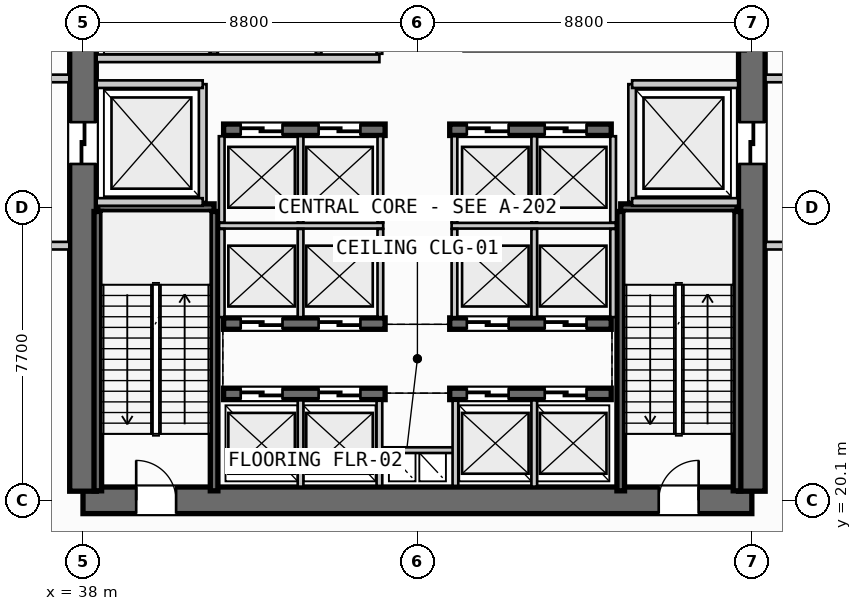
"""IFC4 building model, lengths in metres.
Left out: names, types, materials, properties, quantities, classifications, styles, units other than length and angle.
Written with IfcOpenShell. Run it as: python <this file> out.ifc"""

import sys

from ifc_helpers import new_model, si_unit, direction, frame, frame_2d, origin, place, context, subcontext, project, spatial, rectangle, extrude, source, transform, mapped, element, fill, save


model = new_model("IFC4")
c1 = context("Model", 3, precision=1e-05, world=origin(), true_north=direction((0.0, 1.0)))
c2 = subcontext(c1, "Body", "Model", "MODEL_VIEW")
j1 = project(units=[si_unit("LENGTHUNIT", "METRE"), si_unit("PLANEANGLEUNIT", "RADIAN")], contexts=[c1])
p1 = place(None, origin())
s1 = spatial("IfcSite", under=j1, at=p1, CompositionType="ELEMENT")
p2 = place(p1, origin())
s2 = spatial("IfcBuilding", under=s1, at=p2, CompositionType="ELEMENT")
p3 = place(p2, origin())
s3 = spatial("IfcBuildingStorey", under=s2, at=p3, CompositionType="ELEMENT", Elevation=0.0)
p4 = place(p3, frame((38.0, 20.1, 0.0), z_axis=(0.0, 0.0, 1.0), x_axis=(1.0, 0.0, 0.0)))
e1 = element("IfcWall", 1, at=p4, inside=s3, PredefinedType="SHEAR", context=c2, shape_type="SweptSolid", body=[
    extrude(rectangle(XDim=17.6, YDim=0.7, at=frame_2d((8.8, 0.0))), origin(), (0.0, 0.0, 1.0), 4.95),
])
p5 = place(p4, frame((1.4, 0.0, 0.0)))
e2 = element("IfcOpeningElement", 2, at=p5, cuts=e1, PredefinedType="OPENING", context=c2, shape_type="SweptSolid", body=[
    extrude(rectangle(XDim=1.05, YDim=2.15, at=frame_2d((0.525, 1.075))), frame((0.0, 0.36, 0.0), z_axis=(0.0, -1.0, 0.0), x_axis=(1.0, 0.0, 0.0)), (0.0, 0.0, 1.0), 0.72),
])
p6 = place(p4, frame((15.15, 0.0, 0.0)))
e3 = element("IfcOpeningElement", 3, at=p6, cuts=e1, PredefinedType="OPENING", context=c2, shape_type="SweptSolid", body=[
    extrude(rectangle(XDim=1.05, YDim=2.15, at=frame_2d((0.525, 1.075))), frame((0.0, 0.36, 0.0), z_axis=(0.0, -1.0, 0.0), x_axis=(1.0, 0.0, 0.0)), (0.0, 0.0, 1.0), 0.72),
])
p7 = place(p3, frame((38.0, 35.26, 0.0), z_axis=(0.0, 0.0, 1.0), x_axis=(0.0, -1.0, 0.0)))
e4 = element("IfcWall", 4, at=p7, inside=s3, PredefinedType="SHEAR", context=c2, shape_type="SweptSolid", body=[
    extrude(rectangle(XDim=14.92, YDim=0.7, at=frame_2d((7.46, 0.0))), origin(), (0.0, 0.0, 1.0), 4.95),
])
p8 = place(p7, frame((5.21, 0.0, 0.0)))
e5 = element("IfcOpeningElement", 5, at=p8, cuts=e4, PredefinedType="OPENING", context=c2, shape_type="SweptSolid", body=[
    extrude(rectangle(XDim=1.1, YDim=2.2, at=frame_2d((0.55, 1.1))), frame((0.0, 0.36, 0.0), z_axis=(0.0, -1.0, 0.0), x_axis=(1.0, 0.0, 0.0)), (0.0, 0.0, 1.0), 0.72),
])
p9 = place(p3, frame((55.6, 20.34, 0.0), z_axis=(0.0, 0.0, 1.0), x_axis=(0.0, 1.0, 0.0)))
e6 = element("IfcWall", 6, at=p9, inside=s3, PredefinedType="SHEAR", context=c2, shape_type="SweptSolid", body=[
    extrude(rectangle(XDim=14.92, YDim=0.7, at=frame_2d((7.46, 0.0))), origin(), (0.0, 0.0, 1.0), 4.95),
])
p10 = place(p9, frame((12.71, 0.0, 0.0)))
e7 = element("IfcOpeningElement", 7, at=p10, cuts=e6, PredefinedType="OPENING", context=c2, shape_type="SweptSolid", body=[
    extrude(rectangle(XDim=1.05, YDim=2.15, at=frame_2d((0.525, 1.075))), frame((0.0, 0.36, 0.0), z_axis=(0.0, -1.0, 0.0), x_axis=(1.0, 0.0, 0.0)), (0.0, 0.0, 1.0), 0.72),
])
p11 = place(p9, frame((8.61, 0.0, 0.0)))
e8 = element("IfcOpeningElement", 8, at=p11, cuts=e6, PredefinedType="OPENING", context=c2, shape_type="SweptSolid", body=[
    extrude(rectangle(XDim=1.1, YDim=2.2, at=frame_2d((0.55, 1.1))), frame((0.0, 0.36, 0.0), z_axis=(0.0, -1.0, 0.0), x_axis=(1.0, 0.0, 0.0)), (0.0, 0.0, 1.0), 0.72),
])
p12 = place(p3, frame((41.7, 22.9, 0.0), z_axis=(0.0, 0.0, 1.0), x_axis=(1.0, 0.0, 0.0)))
e9 = element("IfcWall", 9, at=p12, inside=s3, PredefinedType="SHEAR", context=c2, shape_type="SweptSolid", body=[
    extrude(rectangle(XDim=4.25, YDim=0.3, at=frame_2d((2.125, 0.0))), origin(), (0.0, 0.0, 1.0), 4.95),
])
p13 = place(p12, frame((0.45, 0.0, 0.0)))
e10 = element("IfcOpeningElement", 10, at=p13, cuts=e9, PredefinedType="OPENING", context=c2, shape_type="SweptSolid", body=[
    extrude(rectangle(XDim=1.1, YDim=2.2, at=frame_2d((0.55, 1.1))), frame((0.0, 0.16, 0.0), z_axis=(0.0, -1.0, 0.0), x_axis=(1.0, 0.0, 0.0)), (0.0, 0.0, 1.0), 0.32),
])
p14 = place(p12, frame((2.5, 0.0, 0.0)))
e11 = element("IfcOpeningElement", 11, at=p14, cuts=e9, PredefinedType="OPENING", context=c2, shape_type="SweptSolid", body=[
    extrude(rectangle(XDim=1.1, YDim=2.2, at=frame_2d((0.55, 1.1))), frame((0.0, 0.16, 0.0), z_axis=(0.0, -1.0, 0.0), x_axis=(1.0, 0.0, 0.0)), (0.0, 0.0, 1.0), 0.32),
])
p15 = place(p3, frame((47.65, 22.9, 0.0), z_axis=(0.0, 0.0, 1.0), x_axis=(1.0, 0.0, 0.0)))
e12 = element("IfcWall", 12, at=p15, inside=s3, PredefinedType="SHEAR", context=c2, shape_type="SweptSolid", body=[
    extrude(rectangle(XDim=4.25, YDim=0.3, at=frame_2d((2.125, 0.0))), origin(), (0.0, 0.0, 1.0), 4.95),
])
p16 = place(p15, frame((0.45, 0.0, 0.0)))
e13 = element("IfcOpeningElement", 13, at=p16, cuts=e12, PredefinedType="OPENING", context=c2, shape_type="SweptSolid", body=[
    extrude(rectangle(XDim=1.1, YDim=2.2, at=frame_2d((0.55, 1.1))), frame((0.0, 0.16, 0.0), z_axis=(0.0, -1.0, 0.0), x_axis=(1.0, 0.0, 0.0)), (0.0, 0.0, 1.0), 0.32),
])
p17 = place(p15, frame((2.5, 0.0, 0.0)))
e14 = element("IfcOpeningElement", 14, at=p17, cuts=e12, PredefinedType="OPENING", context=c2, shape_type="SweptSolid", body=[
    extrude(rectangle(XDim=1.1, YDim=2.2, at=frame_2d((0.55, 1.1))), frame((0.0, 0.16, 0.0), z_axis=(0.0, -1.0, 0.0), x_axis=(1.0, 0.0, 0.0)), (0.0, 0.0, 1.0), 0.32),
])
p18 = place(p3, frame((41.7, 24.75, 0.0), z_axis=(0.0, 0.0, 1.0), x_axis=(1.0, 0.0, 0.0)))
e15 = element("IfcWall", 15, at=p18, inside=s3, PredefinedType="SHEAR", context=c2, shape_type="SweptSolid", body=[
    extrude(rectangle(XDim=4.25, YDim=0.3, at=frame_2d((2.125, 0.0))), origin(), (0.0, 0.0, 1.0), 4.95),
])
p19 = place(p18, frame((0.45, 0.0, 0.0)))
e16 = element("IfcOpeningElement", 16, at=p19, cuts=e15, PredefinedType="OPENING", context=c2, shape_type="SweptSolid", body=[
    extrude(rectangle(XDim=1.1, YDim=2.2, at=frame_2d((0.55, 1.1))), frame((0.0, 0.16, 0.0), z_axis=(0.0, -1.0, 0.0), x_axis=(1.0, 0.0, 0.0)), (0.0, 0.0, 1.0), 0.32),
])
p20 = place(p18, frame((2.5, 0.0, 0.0)))
e17 = element("IfcOpeningElement", 17, at=p20, cuts=e15, PredefinedType="OPENING", context=c2, shape_type="SweptSolid", body=[
    extrude(rectangle(XDim=1.1, YDim=2.2, at=frame_2d((0.55, 1.1))), frame((0.0, 0.16, 0.0), z_axis=(0.0, -1.0, 0.0), x_axis=(1.0, 0.0, 0.0)), (0.0, 0.0, 1.0), 0.32),
])
p21 = place(p3, frame((47.65, 24.75, 0.0), z_axis=(0.0, 0.0, 1.0), x_axis=(1.0, 0.0, 0.0)))
e18 = element("IfcWall", 18, at=p21, inside=s3, PredefinedType="SHEAR", context=c2, shape_type="SweptSolid", body=[
    extrude(rectangle(XDim=4.25, YDim=0.3, at=frame_2d((2.125, 0.0))), origin(), (0.0, 0.0, 1.0), 4.95),
])
p22 = place(p21, frame((0.45, 0.0, 0.0)))
e19 = element("IfcOpeningElement", 19, at=p22, cuts=e18, PredefinedType="OPENING", context=c2, shape_type="SweptSolid", body=[
    extrude(rectangle(XDim=1.1, YDim=2.2, at=frame_2d((0.55, 1.1))), frame((0.0, 0.16, 0.0), z_axis=(0.0, -1.0, 0.0), x_axis=(1.0, 0.0, 0.0)), (0.0, 0.0, 1.0), 0.32),
])
p23 = place(p21, frame((2.5, 0.0, 0.0)))
e20 = element("IfcOpeningElement", 20, at=p23, cuts=e18, PredefinedType="OPENING", context=c2, shape_type="SweptSolid", body=[
    extrude(rectangle(XDim=1.1, YDim=2.2, at=frame_2d((0.55, 1.1))), frame((0.0, 0.16, 0.0), z_axis=(0.0, -1.0, 0.0), x_axis=(1.0, 0.0, 0.0)), (0.0, 0.0, 1.0), 0.32),
])
p24 = place(p3, frame((41.7, 29.85, 0.0), z_axis=(0.0, 0.0, 1.0), x_axis=(1.0, 0.0, 0.0)))
e21 = element("IfcWall", 21, at=p24, inside=s3, PredefinedType="SHEAR", context=c2, shape_type="SweptSolid", body=[
    extrude(rectangle(XDim=4.25, YDim=0.3, at=frame_2d((2.125, 0.0))), origin(), (0.0, 0.0, 1.0), 4.95),
])
p25 = place(p24, frame((0.45, 0.0, 0.0)))
e22 = element("IfcOpeningElement", 22, at=p25, cuts=e21, PredefinedType="OPENING", context=c2, shape_type="SweptSolid", body=[
    extrude(rectangle(XDim=1.1, YDim=2.2, at=frame_2d((0.55, 1.1))), frame((0.0, 0.16, 0.0), z_axis=(0.0, -1.0, 0.0), x_axis=(1.0, 0.0, 0.0)), (0.0, 0.0, 1.0), 0.32),
])
p26 = place(p24, frame((2.5, 0.0, 0.0)))
e23 = element("IfcOpeningElement", 23, at=p26, cuts=e21, PredefinedType="OPENING", context=c2, shape_type="SweptSolid", body=[
    extrude(rectangle(XDim=1.1, YDim=2.2, at=frame_2d((0.55, 1.1))), frame((0.0, 0.16, 0.0), z_axis=(0.0, -1.0, 0.0), x_axis=(1.0, 0.0, 0.0)), (0.0, 0.0, 1.0), 0.32),
])
p27 = place(p3, frame((47.65, 29.85, 0.0), z_axis=(0.0, 0.0, 1.0), x_axis=(1.0, 0.0, 0.0)))
e24 = element("IfcWall", 24, at=p27, inside=s3, PredefinedType="SHEAR", context=c2, shape_type="SweptSolid", body=[
    extrude(rectangle(XDim=4.25, YDim=0.3, at=frame_2d((2.125, 0.0))), origin(), (0.0, 0.0, 1.0), 4.95),
])
p28 = place(p27, frame((0.45, 0.0, 0.0)))
e25 = element("IfcOpeningElement", 25, at=p28, cuts=e24, PredefinedType="OPENING", context=c2, shape_type="SweptSolid", body=[
    extrude(rectangle(XDim=1.1, YDim=2.2, at=frame_2d((0.55, 1.1))), frame((0.0, 0.16, 0.0), z_axis=(0.0, -1.0, 0.0), x_axis=(1.0, 0.0, 0.0)), (0.0, 0.0, 1.0), 0.32),
])
p29 = place(p27, frame((2.5, 0.0, 0.0)))
e26 = element("IfcOpeningElement", 26, at=p29, cuts=e24, PredefinedType="OPENING", context=c2, shape_type="SweptSolid", body=[
    extrude(rectangle(XDim=1.1, YDim=2.2, at=frame_2d((0.55, 1.1))), frame((0.0, 0.16, 0.0), z_axis=(0.0, -1.0, 0.0), x_axis=(1.0, 0.0, 0.0)), (0.0, 0.0, 1.0), 0.32),
])
p30 = place(p3, frame((38.39, 27.8, 0.0), z_axis=(0.0, 0.0, 1.0), x_axis=(1.0, 0.0, 0.0)))
e27 = element("IfcWall", 27, at=p30, inside=s3, PredefinedType="SHEAR", context=c2, shape_type="SweptSolid", body=[
    extrude(rectangle(XDim=3.06, YDim=0.2, at=frame_2d((1.53, 0.0))), origin(), (0.0, 0.0, 1.0), 4.95),
])
for number, where, z_axis, x_axis in (
    (28, (41.45, 27.7, 0.0), (0.0, 0.0, 1.0), (0.0, -1.0, 0.0)),
    (29, (38.39, 20.35, 0.0), (0.0, 0.0, 1.0), (0.0, 1.0, 0.0)),
):
    element("IfcWall", number, at=place(p3, frame(where, z_axis=z_axis, x_axis=x_axis)), inside=s3, PredefinedType="SHEAR", context=c2, shape_type="SweptSolid", body=[
        extrude(rectangle(XDim=7.35, YDim=0.2, at=frame_2d((3.675, 0.0))), origin(), (0.0, 0.0, 1.0), 4.95),
    ])
p31 = place(p3, frame((52.15, 27.8, 0.0), z_axis=(0.0, 0.0, 1.0), x_axis=(1.0, 0.0, 0.0)))
e30 = element("IfcWall", 30, at=p31, inside=s3, PredefinedType="SHEAR", context=c2, shape_type="SweptSolid", body=[
    extrude(rectangle(XDim=3.06, YDim=0.2, at=frame_2d((1.53, 0.0))), origin(), (0.0, 0.0, 1.0), 4.95),
])
for number, where, z_axis, x_axis in (
    (31, (55.21, 27.7, 0.0), (0.0, 0.0, 1.0), (0.0, -1.0, 0.0)),
    (32, (52.15, 20.35, 0.0), (0.0, 0.0, 1.0), (0.0, 1.0, 0.0)),
):
    element("IfcWall", number, at=place(p3, frame(where, z_axis=z_axis, x_axis=x_axis)), inside=s3, PredefinedType="SHEAR", context=c2, shape_type="SweptSolid", body=[
        extrude(rectangle(XDim=7.35, YDim=0.2, at=frame_2d((3.675, 0.0))), origin(), (0.0, 0.0, 1.0), 4.95),
    ])
p32 = place(p3, frame((45.8, 21.42, 0.0), z_axis=(0.0, 0.0, 1.0), x_axis=(1.0, 0.0, 0.0)))
e33 = element("IfcWall", 33, at=p32, inside=s3, PredefinedType="PARTITIONING", context=c2, shape_type="SweptSolid", body=[
    extrude(rectangle(XDim=2.0, YDim=0.15, at=frame_2d((1.0, 0.0))), origin(), (0.0, 0.0, 1.0), 4.163),
])
for number, where, z_axis, x_axis in (
    (34, (45.8, 20.48, 0.0), (0.0, 0.0, 1.0), (0.0, 1.0, 0.0)),
    (35, (47.8, 20.48, 0.0), (0.0, 0.0, 1.0), (0.0, 1.0, 0.0)),
):
    element("IfcWall", number, at=place(p3, frame(where, z_axis=z_axis, x_axis=x_axis)), inside=s3, PredefinedType="PARTITIONING", context=c2, shape_type="SweptSolid", body=[
        extrude(rectangle(XDim=2.24, YDim=0.15, at=frame_2d((1.12, 0.0))), origin(), (0.0, 0.0, 1.0), 4.163),
    ])
p33 = place(p3, frame((41.15, 27.95, 0.0), z_axis=(0.0, 0.0, 1.0), x_axis=(0.0, 1.0, 0.0)))
e36 = element("IfcWall", 36, at=p33, inside=s3, PredefinedType="PARTITIONING", context=c2, shape_type="SweptSolid", body=[
    extrude(rectangle(XDim=3.1, YDim=0.2, at=frame_2d((1.55, 0.0))), origin(), (0.0, 0.0, 1.0), 4.163),
])
for number, where, z_axis, x_axis in (
    (37, (38.36, 27.95, 0.0), (0.0, 0.0, 1.0), (1.0, 0.0, 0.0)),
    (38, (38.36, 31.05, 0.0), (0.0, 0.0, 1.0), (1.0, 0.0, 0.0)),
):
    element("IfcWall", number, at=place(p3, frame(where, z_axis=z_axis, x_axis=x_axis)), inside=s3, PredefinedType="PARTITIONING", context=c2, shape_type="SweptSolid", body=[
        extrude(rectangle(XDim=2.79, YDim=0.2, at=frame_2d((1.395, 0.0))), origin(), (0.0, 0.0, 1.0), 4.163),
    ])
for number, where, z_axis, x_axis in (
    (39, (34.5, 26.8, 0.0), (0.0, 0.0, 1.0), (1.0, 0.0, 0.0)),
    (40, (34.5, 31.2, 0.0), (0.0, 0.0, 1.0), (1.0, 0.0, 0.0)),
):
    element("IfcWall", number, at=place(p3, frame(where, z_axis=z_axis, x_axis=x_axis)), inside=s3, PredefinedType="PARTITIONING", context=c2, shape_type="SweptSolid", body=[
        extrude(rectangle(XDim=3.14, YDim=0.2, at=frame_2d((1.57, 0.0))), origin(), (0.0, 0.0, 1.0), 4.163),
    ])
p34 = place(p3, frame((52.45, 27.95, 0.0), z_axis=(0.0, 0.0, 1.0), x_axis=(0.0, 1.0, 0.0)))
e41 = element("IfcWall", 41, at=p34, inside=s3, PredefinedType="PARTITIONING", context=c2, shape_type="SweptSolid", body=[
    extrude(rectangle(XDim=3.1, YDim=0.2, at=frame_2d((1.55, 0.0))), origin(), (0.0, 0.0, 1.0), 4.163),
])
for number, where, z_axis, x_axis in (
    (42, (52.45, 27.95, 0.0), (0.0, 0.0, 1.0), (1.0, 0.0, 0.0)),
    (43, (52.45, 31.05, 0.0), (0.0, 0.0, 1.0), (1.0, 0.0, 0.0)),
):
    element("IfcWall", number, at=place(p3, frame(where, z_axis=z_axis, x_axis=x_axis)), inside=s3, PredefinedType="PARTITIONING", context=c2, shape_type="SweptSolid", body=[
        extrude(rectangle(XDim=2.79, YDim=0.2, at=frame_2d((1.395, 0.0))), origin(), (0.0, 0.0, 1.0), 4.163),
    ])
for number, where, z_axis, x_axis in (
    (44, (55.96, 26.8, 0.0), (0.0, 0.0, 1.0), (1.0, 0.0, 0.0)),
    (45, (55.96, 31.2, 0.0), (0.0, 0.0, 1.0), (1.0, 0.0, 0.0)),
):
    element("IfcWall", number, at=place(p3, frame(where, z_axis=z_axis, x_axis=x_axis)), inside=s3, PredefinedType="PARTITIONING", context=c2, shape_type="SweptSolid", body=[
        extrude(rectangle(XDim=3.14, YDim=0.2, at=frame_2d((1.57, 0.0))), origin(), (0.0, 0.0, 1.0), 4.163),
    ])
for number, where, z_axis, x_axis in (
    (46, (43.725, 20.46, 0.0), (0.0, 0.0, 1.0), (0.0, 1.0, 0.0)),
    (47, (49.875, 20.46, 0.0), (0.0, 0.0, 1.0), (0.0, 1.0, 0.0)),
):
    element("IfcWall", number, at=place(p3, frame(where, z_axis=z_axis, x_axis=x_axis)), inside=s3, PredefinedType="PARTITIONING", context=c2, shape_type="SweptSolid", body=[
        extrude(rectangle(XDim=2.27, YDim=0.15, at=frame_2d((1.135, 0.0))), origin(), (0.0, 0.0, 1.0), 4.163),
    ])
p35 = place(p3, frame((41.58, 27.325, 0.0), z_axis=(0.0, 0.0, 1.0), x_axis=(1.0, 0.0, 0.0)))
e48 = element("IfcWall", 48, at=p35, inside=s3, PredefinedType="PARTITIONING", context=c2, shape_type="SweptSolid", body=[
    extrude(rectangle(XDim=4.32, YDim=0.15, at=frame_2d((2.16, 0.0))), origin(), (0.0, 0.0, 1.0), 4.163),
])
p36 = place(p3, frame((47.7, 27.325, 0.0), z_axis=(0.0, 0.0, 1.0), x_axis=(1.0, 0.0, 0.0)))
e49 = element("IfcWall", 49, at=p36, inside=s3, PredefinedType="PARTITIONING", context=c2, shape_type="SweptSolid", body=[
    extrude(rectangle(XDim=4.32, YDim=0.15, at=frame_2d((2.16, 0.0))), origin(), (0.0, 0.0, 1.0), 4.163),
])
for number, where, z_axis, x_axis in (
    (50, (41.65, 24.92, 0.0), (0.0, 0.0, 1.0), (0.0, 1.0, 0.0)),
    (51, (43.725, 24.92, 0.0), (0.0, 0.0, 1.0), (0.0, 1.0, 0.0)),
    (52, (45.825, 24.92, 0.0), (0.0, 0.0, 1.0), (0.0, 1.0, 0.0)),
    (53, (47.775, 24.92, 0.0), (0.0, 0.0, 1.0), (0.0, 1.0, 0.0)),
    (54, (49.875, 24.92, 0.0), (0.0, 0.0, 1.0), (0.0, 1.0, 0.0)),
    (55, (51.95, 24.92, 0.0), (0.0, 0.0, 1.0), (0.0, 1.0, 0.0)),
):
    element("IfcWall", number, at=place(p3, frame(where, z_axis=z_axis, x_axis=x_axis)), inside=s3, PredefinedType="PARTITIONING", context=c2, shape_type="SweptSolid", body=[
        extrude(rectangle(XDim=2.32, YDim=0.15, at=frame_2d((1.16, 0.0))), origin(), (0.0, 0.0, 1.0), 4.163),
    ])
for number, where, z_axis, x_axis in (
    (56, (41.65, 27.41, 0.0), (0.0, 0.0, 1.0), (0.0, 1.0, 0.0)),
    (57, (43.725, 27.41, 0.0), (0.0, 0.0, 1.0), (0.0, 1.0, 0.0)),
    (58, (45.825, 27.41, 0.0), (0.0, 0.0, 1.0), (0.0, 1.0, 0.0)),
    (59, (47.775, 27.41, 0.0), (0.0, 0.0, 1.0), (0.0, 1.0, 0.0)),
    (60, (49.875, 27.41, 0.0), (0.0, 0.0, 1.0), (0.0, 1.0, 0.0)),
    (61, (51.95, 27.41, 0.0), (0.0, 0.0, 1.0), (0.0, 1.0, 0.0)),
):
    element("IfcWall", number, at=place(p3, frame(where, z_axis=z_axis, x_axis=x_axis)), inside=s3, PredefinedType="PARTITIONING", context=c2, shape_type="SweptSolid", body=[
        extrude(rectangle(XDim=2.27, YDim=0.15, at=frame_2d((1.135, 0.0))), origin(), (0.0, 0.0, 1.0), 4.163),
    ])
p37 = place(p3, frame((41.45, 31.85, 0.0), z_axis=(0.0, 0.0, 1.0), x_axis=(0.0, 1.0, 0.0)))
e62 = element("IfcWall", 62, at=p37, inside=s3, PredefinedType="PARTITIONING", context=c2, shape_type="SweptSolid", body=[
    extrude(rectangle(XDim=3.29, YDim=0.2, at=frame_2d((1.645, 0.0))), origin(), (0.0, 0.0, 1.0), 4.163),
])
p38 = place(p3, frame((38.36, 31.73, 0.0), z_axis=(0.0, 0.0, 1.0), x_axis=(1.0, 0.0, 0.0)))
e63 = element("IfcWall", 63, at=p38, inside=s3, PredefinedType="PARTITIONING", context=c2, shape_type="SweptSolid", body=[
    extrude(rectangle(XDim=7.44, YDim=0.2, at=frame_2d((3.72, 0.0))), origin(), (0.0, 0.0, 1.0), 4.163),
])
p39 = place(p3, frame((45.8, 31.85, 0.0), z_axis=(0.0, 0.0, 1.0), x_axis=(0.0, 1.0, 0.0)))
e64 = element("IfcWall", 64, at=p39, inside=s3, PredefinedType="PARTITIONING", context=c2, shape_type="SweptSolid", body=[
    extrude(rectangle(XDim=3.29, YDim=0.15, at=frame_2d((1.645, 0.0))), origin(), (0.0, 0.0, 1.0), 4.163),
])
p40 = place(p3, frame((44.2, 31.85, 0.0), z_axis=(0.0, 0.0, 1.0), x_axis=(0.0, 1.0, 0.0)))
e65 = element("IfcWall", 65, at=p40, inside=s3, PredefinedType="PLUMBINGWALL", context=c2, shape_type="SweptSolid", body=[
    extrude(rectangle(XDim=3.29, YDim=0.15, at=frame_2d((1.645, 0.0))), origin(), (0.0, 0.0, 1.0), 4.163),
])
m1 = source(origin(), c2, "Body", "SweptSolid", [
    extrude(rectangle(XDim=1.05, YDim=2.15, at=frame_2d((0.525, 1.075))), frame((0.0, 0.025, 0.0), z_axis=(0.0, -1.0, 0.0), x_axis=(1.0, 0.0, 0.0)), (0.0, 0.0, 1.0), 0.05),
])
p41 = place(p5, origin())
e66 = element("IfcDoor", 66, at=p41, inside=s3, OperationType="SINGLE_SWING_LEFT", PredefinedType="DOOR", context=c2, shape_type="MappedRepresentation", body=[
    mapped(m1, transform((0.0, 0.0, 0.0), scale=1.0)),
])
fill(e2, e66)
p42 = place(p6, origin())
e67 = element("IfcDoor", 67, at=p42, inside=s3, OperationType="SINGLE_SWING_RIGHT", PredefinedType="DOOR", context=c2, shape_type="MappedRepresentation", body=[
    mapped(m1, transform((0.0, 0.0, 0.0), scale=1.0)),
])
fill(e3, e67)
m2 = source(origin(), c2, "Body", "SweptSolid", [
    extrude(rectangle(XDim=1.1, YDim=2.2, at=frame_2d((0.55, 1.1))), frame((0.0, 0.025, 0.0), z_axis=(0.0, -1.0, 0.0), x_axis=(1.0, 0.0, 0.0)), (0.0, 0.0, 1.0), 0.05),
])
p43 = place(p8, origin())
e68 = element("IfcDoor", 68, at=p43, inside=s3, OperationType="SLIDING_TO_LEFT", PredefinedType="DOOR", context=c2, shape_type="MappedRepresentation", body=[
    mapped(m2, transform((0.0, 0.0, 0.0), scale=1.0)),
])
fill(e5, e68)
p44 = place(p11, origin())
e69 = element("IfcDoor", 69, at=p44, inside=s3, OperationType="SLIDING_TO_RIGHT", PredefinedType="DOOR", context=c2, shape_type="MappedRepresentation", body=[
    mapped(m2, transform((0.0, 0.0, 0.0), scale=1.0)),
])
fill(e8, e69)
p45 = place(p13, origin())
e70 = element("IfcDoor", 70, at=p45, inside=s3, OperationType="SLIDING_TO_LEFT", PredefinedType="DOOR", context=c2, shape_type="MappedRepresentation", body=[
    mapped(m2, transform((0.0, 0.0, 0.0), scale=1.0)),
])
fill(e10, e70)
p46 = place(p14, origin())
e71 = element("IfcDoor", 71, at=p46, inside=s3, OperationType="SLIDING_TO_LEFT", PredefinedType="DOOR", context=c2, shape_type="MappedRepresentation", body=[
    mapped(m2, transform((0.0, 0.0, 0.0), scale=1.0)),
])
fill(e11, e71)
p47 = place(p16, origin())
e72 = element("IfcDoor", 72, at=p47, inside=s3, OperationType="SLIDING_TO_LEFT", PredefinedType="DOOR", context=c2, shape_type="MappedRepresentation", body=[
    mapped(m2, transform((0.0, 0.0, 0.0), scale=1.0)),
])
fill(e13, e72)
p48 = place(p17, origin())
e73 = element("IfcDoor", 73, at=p48, inside=s3, OperationType="SLIDING_TO_LEFT", PredefinedType="DOOR", context=c2, shape_type="MappedRepresentation", body=[
    mapped(m2, transform((0.0, 0.0, 0.0), scale=1.0)),
])
fill(e14, e73)
p49 = place(p19, origin())
e74 = element("IfcDoor", 74, at=p49, inside=s3, OperationType="SLIDING_TO_RIGHT", PredefinedType="DOOR", context=c2, shape_type="MappedRepresentation", body=[
    mapped(m2, transform((0.0, 0.0, 0.0), scale=1.0)),
])
fill(e16, e74)
p50 = place(p20, origin())
e75 = element("IfcDoor", 75, at=p50, inside=s3, OperationType="SLIDING_TO_RIGHT", PredefinedType="DOOR", context=c2, shape_type="MappedRepresentation", body=[
    mapped(m2, transform((0.0, 0.0, 0.0), scale=1.0)),
])
fill(e17, e75)
p51 = place(p22, origin())
e76 = element("IfcDoor", 76, at=p51, inside=s3, OperationType="SLIDING_TO_RIGHT", PredefinedType="DOOR", context=c2, shape_type="MappedRepresentation", body=[
    mapped(m2, transform((0.0, 0.0, 0.0), scale=1.0)),
])
fill(e19, e76)
p52 = place(p23, origin())
e77 = element("IfcDoor", 77, at=p52, inside=s3, OperationType="SLIDING_TO_RIGHT", PredefinedType="DOOR", context=c2, shape_type="MappedRepresentation", body=[
    mapped(m2, transform((0.0, 0.0, 0.0), scale=1.0)),
])
fill(e20, e77)
p53 = place(p25, origin())
e78 = element("IfcDoor", 78, at=p53, inside=s3, OperationType="SLIDING_TO_LEFT", PredefinedType="DOOR", context=c2, shape_type="MappedRepresentation", body=[
    mapped(m2, transform((0.0, 0.0, 0.0), scale=1.0)),
])
fill(e22, e78)
p54 = place(p26, origin())
e79 = element("IfcDoor", 79, at=p54, inside=s3, OperationType="SLIDING_TO_LEFT", PredefinedType="DOOR", context=c2, shape_type="MappedRepresentation", body=[
    mapped(m2, transform((0.0, 0.0, 0.0), scale=1.0)),
])
fill(e23, e79)
p55 = place(p28, origin())
e80 = element("IfcDoor", 80, at=p55, inside=s3, OperationType="SLIDING_TO_LEFT", PredefinedType="DOOR", context=c2, shape_type="MappedRepresentation", body=[
    mapped(m2, transform((0.0, 0.0, 0.0), scale=1.0)),
])
fill(e25, e80)
p56 = place(p29, origin())
e81 = element("IfcDoor", 81, at=p56, inside=s3, OperationType="SLIDING_TO_LEFT", PredefinedType="DOOR", context=c2, shape_type="MappedRepresentation", body=[
    mapped(m2, transform((0.0, 0.0, 0.0), scale=1.0)),
])
fill(e26, e81)
save(model, sys.argv[1])
